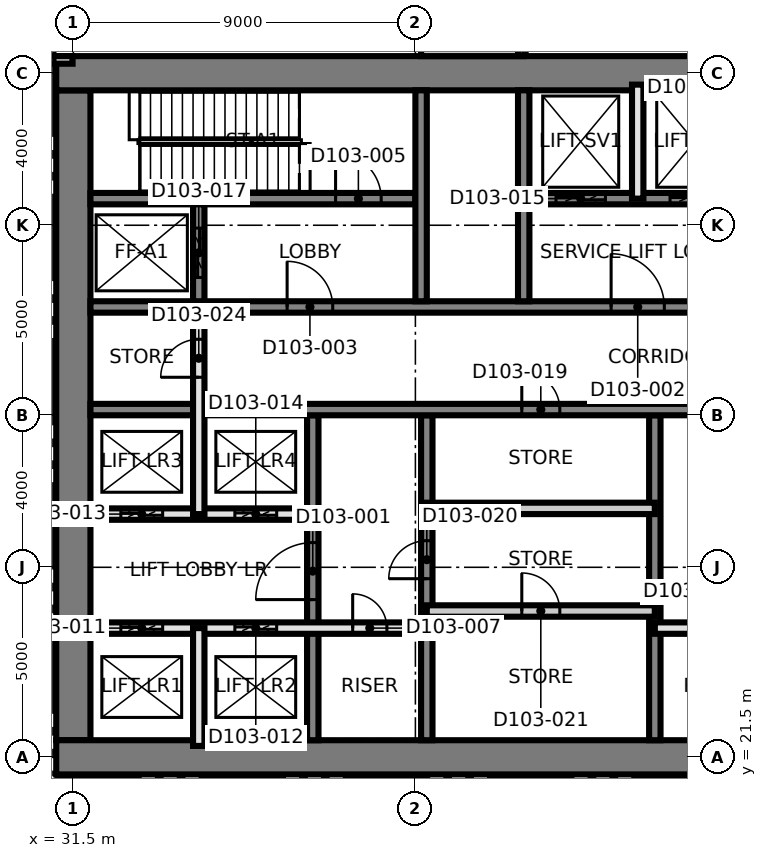
"""IFC4 building model, lengths in metres.
Left out: names, types, materials, properties, quantities, classifications, styles, units other than length and angle.
Written with IfcOpenShell. Run it as: python <this file> out.ifc"""

import sys

from ifc_helpers import new_model, si_unit, direction, frame, frame_2d, origin, place, context, subcontext, project, spatial, rectangle, extrude, element, fill, save


model = new_model("IFC4")
c1 = context("Model", 3, precision=1e-05, world=origin(), true_north=direction((0.0, 1.0)))
c2 = subcontext(c1, "Body", "Model", "MODEL_VIEW")
j1 = project(units=[si_unit("LENGTHUNIT", "METRE"), si_unit("PLANEANGLEUNIT", "RADIAN")], contexts=[c1])
p1 = place(None, origin())
s1 = spatial("IfcSite", under=j1, at=p1, CompositionType="ELEMENT")
p2 = place(p1, origin())
s2 = spatial("IfcBuilding", under=s1, at=p2, CompositionType="ELEMENT")
p3 = place(p2, frame((0.0, 0.0, 8.0)))
s3 = spatial("IfcBuildingStorey", under=s2, at=p3, CompositionType="ELEMENT", Elevation=8.0)
p4 = place(p3, frame((31.5, 21.95, 0.0), z_axis=(0.0, 0.0, 1.0), x_axis=(0.0, 1.0, 0.0)))
e1 = element("IfcWall", 1, at=p4, inside=s3, PredefinedType="SHEAR", context=c2, shape_type="SweptSolid", body=[
    extrude(rectangle(XDim=17.1, YDim=0.9, at=frame_2d((8.55, 0.0))), origin(), (0.0, 0.0, 1.0), 5.5),
])
for number, where, z_axis, x_axis in (
    (2, (31.05, 21.5, 0.0), (0.0, 0.0, 1.0), (1.0, 0.0, 0.0)),
    (3, (31.05, 39.5, 0.0), (0.0, 0.0, 1.0), (1.0, 0.0, 0.0)),
):
    element("IfcWall", number, at=place(p3, frame(where, z_axis=z_axis, x_axis=x_axis)), inside=s3, PredefinedType="SHEAR", context=c2, shape_type="SweptSolid", body=[
        extrude(rectangle(XDim=27.0, YDim=0.9, at=frame_2d((13.5, 0.0))), origin(), (0.0, 0.0, 1.0), 5.5),
    ])
p5 = place(p3, frame((37.8, 21.95, 0.0), z_axis=(0.0, 0.0, 1.0), x_axis=(0.0, 1.0, 0.0)))
e4 = element("IfcWall", 4, at=p5, inside=s3, PredefinedType="SHEAR", context=c2, shape_type="SweptSolid", body=[
    extrude(rectangle(XDim=8.55, YDim=0.3, at=frame_2d((4.275, 0.0))), origin(), (0.0, 0.0, 1.0), 5.5),
])
p6 = place(p5, frame((3.7, 0.0, 0.0)))
e5 = element("IfcOpeningElement", 5, at=p6, cuts=e4, PredefinedType="OPENING", context=c2, shape_type="SweptSolid", body=[
    extrude(rectangle(XDim=1.5, YDim=2.1, at=frame_2d((0.75, 1.05))), frame((0.0, 0.16, 0.0), z_axis=(0.0, -1.0, 0.0), x_axis=(1.0, 0.0, 0.0)), (0.0, 0.0, 1.0), 0.32),
])
p7 = place(p3, frame((40.8, 21.95, 0.0), z_axis=(0.0, 0.0, 1.0), x_axis=(0.0, 1.0, 0.0)))
e6 = element("IfcWall", 6, at=p7, inside=s3, PredefinedType="SHEAR", context=c2, shape_type="SweptSolid", body=[
    extrude(rectangle(XDim=8.55, YDim=0.3, at=frame_2d((4.275, 0.0))), origin(), (0.0, 0.0, 1.0), 5.5),
])
p8 = place(p7, frame((4.25, 0.0, 0.0)))
e7 = element("IfcOpeningElement", 7, at=p8, cuts=e6, PredefinedType="OPENING", context=c2, shape_type="SweptSolid", body=[
    extrude(rectangle(XDim=1.0, YDim=2.1, at=frame_2d((0.5, 1.05))), frame((0.0, 0.16, 0.0), z_axis=(0.0, -1.0, 0.0), x_axis=(1.0, 0.0, 0.0)), (0.0, 0.0, 1.0), 0.32),
])
p9 = place(p3, frame((46.8, 21.95, 0.0), z_axis=(0.0, 0.0, 1.0), x_axis=(0.0, 1.0, 0.0)))
e8 = element("IfcWall", 8, at=p9, inside=s3, PredefinedType="SHEAR", context=c2, shape_type="SweptSolid", body=[
    extrude(rectangle(XDim=8.55, YDim=0.3, at=frame_2d((4.275, 0.0))), origin(), (0.0, 0.0, 1.0), 5.5),
])
p10 = place(p3, frame((31.95, 30.65, 0.0), z_axis=(0.0, 0.0, 1.0), x_axis=(1.0, 0.0, 0.0)))
e9 = element("IfcWall", 9, at=p10, inside=s3, PredefinedType="SHEAR", context=c2, shape_type="SweptSolid", body=[
    extrude(rectangle(XDim=26.1, YDim=0.3, at=frame_2d((13.05, 0.0))), origin(), (0.0, 0.0, 1.0), 5.5),
])
p11 = place(p10, frame((24.55, 0.0, 0.0)))
e10 = element("IfcOpeningElement", 10, at=p11, cuts=e9, PredefinedType="OPENING", context=c2, shape_type="SweptSolid", body=[
    extrude(rectangle(XDim=1.0, YDim=2.1, at=frame_2d((0.5, 1.05))), frame((0.0, 0.16, 0.0), z_axis=(0.0, -1.0, 0.0), x_axis=(1.0, 0.0, 0.0)), (0.0, 0.0, 1.0), 0.32),
])
p12 = place(p10, frame((11.35, 0.0, 0.0)))
e11 = element("IfcOpeningElement", 11, at=p12, cuts=e9, PredefinedType="OPENING", context=c2, shape_type="SweptSolid", body=[
    extrude(rectangle(XDim=1.0, YDim=2.1, at=frame_2d((0.5, 1.05))), frame((0.0, 0.16, 0.0), z_axis=(0.0, -1.0, 0.0), x_axis=(1.0, 0.0, 0.0)), (0.0, 0.0, 1.0), 0.32),
])
p13 = place(p3, frame((31.95, 33.35, 0.0), z_axis=(0.0, 0.0, 1.0), x_axis=(1.0, 0.0, 0.0)))
e12 = element("IfcWall", 12, at=p13, inside=s3, PredefinedType="SHEAR", context=c2, shape_type="SweptSolid", body=[
    extrude(rectangle(XDim=26.1, YDim=0.3, at=frame_2d((13.05, 0.0))), origin(), (0.0, 0.0, 1.0), 5.5),
])
p14 = place(p13, frame((13.7, 0.0, 0.0)))
e13 = element("IfcOpeningElement", 13, at=p14, cuts=e12, PredefinedType="OPENING", context=c2, shape_type="SweptSolid", body=[
    extrude(rectangle(XDim=1.4, YDim=2.1, at=frame_2d((0.7, 1.05))), frame((0.0, 0.16, 0.0), z_axis=(0.0, -1.0, 0.0), x_axis=(1.0, 0.0, 0.0)), (0.0, 0.0, 1.0), 0.32),
])
p15 = place(p13, frame((5.175, 0.0, 0.0)))
e14 = element("IfcOpeningElement", 14, at=p15, cuts=e12, PredefinedType="OPENING", context=c2, shape_type="SweptSolid", body=[
    extrude(rectangle(XDim=1.2, YDim=2.1, at=frame_2d((0.6, 1.05))), frame((0.0, 0.16, 0.0), z_axis=(0.0, -1.0, 0.0), x_axis=(1.0, 0.0, 0.0)), (0.0, 0.0, 1.0), 0.32),
])
p16 = place(p13, frame((19.725, 0.0, 0.0)))
e15 = element("IfcOpeningElement", 15, at=p16, cuts=e12, PredefinedType="OPENING", context=c2, shape_type="SweptSolid", body=[
    extrude(rectangle(XDim=1.2, YDim=2.1, at=frame_2d((0.6, 1.05))), frame((0.0, 0.16, 0.0), z_axis=(0.0, -1.0, 0.0), x_axis=(1.0, 0.0, 0.0)), (0.0, 0.0, 1.0), 0.32),
])
p17 = place(p3, frame((31.95, 36.2, 0.0), z_axis=(0.0, 0.0, 1.0), x_axis=(1.0, 0.0, 0.0)))
e16 = element("IfcWall", 16, at=p17, inside=s3, PredefinedType="SHEAR", context=c2, shape_type="SweptSolid", body=[
    extrude(rectangle(XDim=8.55, YDim=0.3, at=frame_2d((4.275, 0.0))), origin(), (0.0, 0.0, 1.0), 5.5),
])
p18 = place(p17, frame((6.45, 0.0, 0.0)))
e17 = element("IfcOpeningElement", 17, at=p18, cuts=e16, PredefinedType="OPENING", context=c2, shape_type="SweptSolid", body=[
    extrude(rectangle(XDim=1.2, YDim=2.1, at=frame_2d((0.6, 1.05))), frame((0.0, 0.16, 0.0), z_axis=(0.0, -1.0, 0.0), x_axis=(1.0, 0.0, 0.0)), (0.0, 0.0, 1.0), 0.32),
])
p19 = place(p3, frame((43.5, 36.2, 0.0), z_axis=(0.0, 0.0, 1.0), x_axis=(1.0, 0.0, 0.0)))
e18 = element("IfcWall", 18, at=p19, inside=s3, PredefinedType="SHEAR", context=c2, shape_type="SweptSolid", body=[
    extrude(rectangle(XDim=14.55, YDim=0.3, at=frame_2d((7.275, 0.0))), origin(), (0.0, 0.0, 1.0), 5.5),
])
p20 = place(p19, frame((6.9, 0.0, 0.0)))
e19 = element("IfcOpeningElement", 19, at=p20, cuts=e18, PredefinedType="OPENING", context=c2, shape_type="SweptSolid", body=[
    extrude(rectangle(XDim=1.2, YDim=2.1, at=frame_2d((0.6, 1.05))), frame((0.0, 0.16, 0.0), z_axis=(0.0, -1.0, 0.0), x_axis=(1.0, 0.0, 0.0)), (0.0, 0.0, 1.0), 0.32),
])
p21 = place(p19, frame((0.7, 0.0, 0.0)))
e20 = element("IfcOpeningElement", 20, at=p21, cuts=e18, PredefinedType="OPENING", context=c2, shape_type="SweptSolid", body=[
    extrude(rectangle(XDim=1.3, YDim=2.4, at=frame_2d((0.65, 1.2))), frame((0.0, 0.16, 0.0), z_axis=(0.0, -1.0, 0.0), x_axis=(1.0, 0.0, 0.0)), (0.0, 0.0, 1.0), 0.32),
])
p22 = place(p19, frame((3.7, 0.0, 0.0)))
e21 = element("IfcOpeningElement", 21, at=p22, cuts=e18, PredefinedType="OPENING", context=c2, shape_type="SweptSolid", body=[
    extrude(rectangle(XDim=1.3, YDim=2.4, at=frame_2d((0.65, 1.2))), frame((0.0, 0.16, 0.0), z_axis=(0.0, -1.0, 0.0), x_axis=(1.0, 0.0, 0.0)), (0.0, 0.0, 1.0), 0.32),
])
for number, where, z_axis, x_axis in (
    (22, (40.65, 33.5, 0.0), (0.0, 0.0, 1.0), (0.0, 1.0, 0.0)),
    (23, (43.35, 33.5, 0.0), (0.0, 0.0, 1.0), (0.0, 1.0, 0.0)),
):
    element("IfcWall", number, at=place(p3, frame(where, z_axis=z_axis, x_axis=x_axis)), inside=s3, PredefinedType="SHEAR", context=c2, shape_type="SweptSolid", body=[
        extrude(rectangle(XDim=5.55, YDim=0.3, at=frame_2d((2.775, 0.0))), origin(), (0.0, 0.0, 1.0), 5.5),
    ])
p23 = place(p3, frame((34.8, 33.5, 0.0), z_axis=(0.0, 0.0, 1.0), x_axis=(0.0, 1.0, 0.0)))
e24 = element("IfcWall", 24, at=p23, inside=s3, PredefinedType="SHEAR", context=c2, shape_type="SweptSolid", body=[
    extrude(rectangle(XDim=2.55, YDim=0.3, at=frame_2d((1.275, 0.0))), origin(), (0.0, 0.0, 1.0), 5.5),
])
p24 = place(p23, frame((0.625, 0.0, 0.0)))
e25 = element("IfcOpeningElement", 25, at=p24, cuts=e24, PredefinedType="OPENING", context=c2, shape_type="SweptSolid", body=[
    extrude(rectangle(XDim=1.3, YDim=2.4, at=frame_2d((0.65, 1.2))), frame((0.0, 0.16, 0.0), z_axis=(0.0, -1.0, 0.0), x_axis=(1.0, 0.0, 0.0)), (0.0, 0.0, 1.0), 0.32),
])
p25 = place(p3, frame((31.8, 24.9, 0.0), z_axis=(0.0, 0.0, 1.0), x_axis=(1.0, 0.0, 0.0)))
e26 = element("IfcWall", 26, at=p25, inside=s3, PredefinedType="SOLIDWALL", context=c2, shape_type="SweptSolid", body=[
    extrude(rectangle(XDim=9.0, YDim=0.3, at=frame_2d((4.5, 0.0))), origin(), (0.0, 0.0, 1.0), 5.2),
])
p26 = place(p25, frame((7.05, 0.0, 0.0)))
e27 = element("IfcOpeningElement", 27, at=p26, cuts=e26, PredefinedType="OPENING", context=c2, shape_type="SweptSolid", body=[
    extrude(rectangle(XDim=0.9, YDim=2.1, at=frame_2d((0.45, 1.05))), frame((0.0, 0.16, 0.0), z_axis=(0.0, -1.0, 0.0), x_axis=(1.0, 0.0, 0.0)), (0.0, 0.0, 1.0), 0.32),
])
p27 = place(p25, frame((0.95, 0.0, 0.0)))
e28 = element("IfcOpeningElement", 28, at=p27, cuts=e26, PredefinedType="OPENING", context=c2, shape_type="SweptSolid", body=[
    extrude(rectangle(XDim=1.1, YDim=2.4, at=frame_2d((0.55, 1.2))), frame((0.0, 0.16, 0.0), z_axis=(0.0, -1.0, 0.0), x_axis=(1.0, 0.0, 0.0)), (0.0, 0.0, 1.0), 0.32),
])
p28 = place(p25, frame((3.95, 0.0, 0.0)))
e29 = element("IfcOpeningElement", 29, at=p28, cuts=e26, PredefinedType="OPENING", context=c2, shape_type="SweptSolid", body=[
    extrude(rectangle(XDim=1.1, YDim=2.4, at=frame_2d((0.55, 1.2))), frame((0.0, 0.16, 0.0), z_axis=(0.0, -1.0, 0.0), x_axis=(1.0, 0.0, 0.0)), (0.0, 0.0, 1.0), 0.32),
])
p29 = place(p3, frame((46.8, 24.9, 0.0), z_axis=(0.0, 0.0, 1.0), x_axis=(1.0, 0.0, 0.0)))
e30 = element("IfcWall", 30, at=p29, inside=s3, PredefinedType="SOLIDWALL", context=c2, shape_type="SweptSolid", body=[
    extrude(rectangle(XDim=9.0, YDim=0.3, at=frame_2d((4.5, 0.0))), origin(), (0.0, 0.0, 1.0), 5.2),
])
p30 = place(p29, frame((1.05, 0.0, 0.0)))
e31 = element("IfcOpeningElement", 31, at=p30, cuts=e30, PredefinedType="OPENING", context=c2, shape_type="SweptSolid", body=[
    extrude(rectangle(XDim=0.9, YDim=2.1, at=frame_2d((0.45, 1.05))), frame((0.0, 0.16, 0.0), z_axis=(0.0, -1.0, 0.0), x_axis=(1.0, 0.0, 0.0)), (0.0, 0.0, 1.0), 0.32),
])
p31 = place(p3, frame((40.8, 25.35, 0.0), z_axis=(0.0, 0.0, 1.0), x_axis=(1.0, 0.0, 0.0)))
e32 = element("IfcWall", 32, at=p31, inside=s3, PredefinedType="PARTITIONING", context=c2, shape_type="SweptSolid", body=[
    extrude(rectangle(XDim=6.0, YDim=0.3, at=frame_2d((3.0, 0.0))), origin(), (0.0, 0.0, 1.0), 5.2),
])
p32 = place(p31, frame((2.5, 0.0, 0.0)))
e33 = element("IfcOpeningElement", 33, at=p32, cuts=e32, PredefinedType="OPENING", context=c2, shape_type="SweptSolid", body=[
    extrude(rectangle(XDim=1.0, YDim=2.1, at=frame_2d((0.5, 1.05))), frame((0.0, 0.16, 0.0), z_axis=(0.0, -1.0, 0.0), x_axis=(1.0, 0.0, 0.0)), (0.0, 0.0, 1.0), 0.32),
])
p33 = place(p3, frame((31.8, 27.9, 0.0), z_axis=(0.0, 0.0, 1.0), x_axis=(1.0, 0.0, 0.0)))
e34 = element("IfcWall", 34, at=p33, inside=s3, PredefinedType="SOLIDWALL", context=c2, shape_type="SweptSolid", body=[
    extrude(rectangle(XDim=6.0, YDim=0.3, at=frame_2d((3.0, 0.0))), origin(), (0.0, 0.0, 1.0), 5.2),
])
p34 = place(p33, frame((0.95, 0.0, 0.0)))
e35 = element("IfcOpeningElement", 35, at=p34, cuts=e34, PredefinedType="OPENING", context=c2, shape_type="SweptSolid", body=[
    extrude(rectangle(XDim=1.1, YDim=2.4, at=frame_2d((0.55, 1.2))), frame((0.0, 0.16, 0.0), z_axis=(0.0, -1.0, 0.0), x_axis=(1.0, 0.0, 0.0)), (0.0, 0.0, 1.0), 0.32),
])
p35 = place(p33, frame((3.95, 0.0, 0.0)))
e36 = element("IfcOpeningElement", 36, at=p35, cuts=e34, PredefinedType="OPENING", context=c2, shape_type="SweptSolid", body=[
    extrude(rectangle(XDim=1.1, YDim=2.4, at=frame_2d((0.55, 1.2))), frame((0.0, 0.16, 0.0), z_axis=(0.0, -1.0, 0.0), x_axis=(1.0, 0.0, 0.0)), (0.0, 0.0, 1.0), 0.32),
])
p36 = place(p3, frame((40.8, 28.05, 0.0), z_axis=(0.0, 0.0, 1.0), x_axis=(1.0, 0.0, 0.0)))
e37 = element("IfcWall", 37, at=p36, inside=s3, PredefinedType="PARTITIONING", context=c2, shape_type="SweptSolid", body=[
    extrude(rectangle(XDim=6.0, YDim=0.3, at=frame_2d((3.0, 0.0))), origin(), (0.0, 0.0, 1.0), 5.2),
])
p37 = place(p3, frame((40.65, 40.1, 0.0), z_axis=(0.0, 0.0, 1.0), x_axis=(1.0, 0.0, 0.0)))
e38 = element("IfcWall", 38, at=p37, inside=s3, PredefinedType="PARTITIONING", context=c2, shape_type="SweptSolid", body=[
    extrude(rectangle(XDim=2.7, YDim=0.3, at=frame_2d((1.35, 0.0))), origin(), (0.0, 0.0, 1.0), 5.2),
])
p38 = place(p3, frame((34.8, 21.8, 0.0), z_axis=(0.0, 0.0, 1.0), x_axis=(0.0, 1.0, 0.0)))
e39 = element("IfcWall", 39, at=p38, inside=s3, PredefinedType="SOLIDWALL", context=c2, shape_type="SweptSolid", body=[
    extrude(rectangle(XDim=3.1, YDim=0.3, at=frame_2d((1.55, 0.0))), origin(), (0.0, 0.0, 1.0), 5.2),
])
p39 = place(p3, frame((34.8, 27.9, 0.0), z_axis=(0.0, 0.0, 1.0), x_axis=(0.0, 1.0, 0.0)))
e40 = element("IfcWall", 40, at=p39, inside=s3, PredefinedType="SOLIDWALL", context=c2, shape_type="SweptSolid", body=[
    extrude(rectangle(XDim=5.45, YDim=0.3, at=frame_2d((2.725, 0.0))), origin(), (0.0, 0.0, 1.0), 5.2),
])
p40 = place(p39, frame((3.6, 0.0, 0.0)))
e41 = element("IfcOpeningElement", 41, at=p40, cuts=e40, PredefinedType="OPENING", context=c2, shape_type="SweptSolid", body=[
    extrude(rectangle(XDim=1.0, YDim=2.1, at=frame_2d((0.5, 1.05))), frame((0.0, 0.16, 0.0), z_axis=(0.0, -1.0, 0.0), x_axis=(1.0, 0.0, 0.0)), (0.0, 0.0, 1.0), 0.32),
])
p41 = place(p3, frame((46.35, 36.2, 0.0), z_axis=(0.0, 0.0, 1.0), x_axis=(0.0, 1.0, 0.0)))
e42 = element("IfcWall", 42, at=p41, inside=s3, PredefinedType="SOLIDWALL", context=c2, shape_type="SweptSolid", body=[
    extrude(rectangle(XDim=3.0, YDim=0.3, at=frame_2d((1.5, 0.0))), origin(), (0.0, 0.0, 1.0), 5.2),
])
p42 = place(p3, frame((21.07, 39.85, 0.0), z_axis=(0.0, 0.0, 1.0), x_axis=(1.0, 0.0, 0.0)))
e43 = element("IfcWall", 43, at=p42, inside=s3, PredefinedType="PARTITIONING", context=c2, shape_type="SweptSolid", body=[
    extrude(rectangle(XDim=10.41, YDim=0.2, at=frame_2d((5.205, 0.0))), origin(), (0.0, 0.0, 1.0), 5.2),
])
p43 = place(p42, frame((4.557, 0.0, 0.0)))
e44 = element("IfcOpeningElement", 44, at=p43, cuts=e43, PredefinedType="OPENING", context=c2, shape_type="SweptSolid", body=[
    extrude(rectangle(XDim=1.0, YDim=2.1, at=frame_2d((0.5, 1.05))), frame((0.0, 0.11, 0.0), z_axis=(0.0, -1.0, 0.0), x_axis=(1.0, 0.0, 0.0)), (0.0, 0.0, 1.0), 0.22),
])
p44 = place(p3, frame((43.3, 39.97, 0.0), z_axis=(0.0, 0.0, 1.0), x_axis=(0.0, 1.0, 0.0)))
e45 = element("IfcWall", 45, at=p44, inside=s3, PredefinedType="PARTITIONING", context=c2, shape_type="SweptSolid", body=[
    extrude(rectangle(XDim=2.28, YDim=0.2, at=frame_2d((1.14, 0.0))), origin(), (0.0, 0.0, 1.0), 5.2),
])
p45 = place(p6, origin())
e46 = element("IfcDoor", 46, at=p45, inside=s3, OperationType="SINGLE_SWING_LEFT", PredefinedType="DOOR", context=c2, shape_type="SweptSolid", body=[
    extrude(rectangle(XDim=1.5, YDim=2.1, at=frame_2d((0.75, 1.05))), frame((0.0, 0.025, 0.0), z_axis=(0.0, -1.0, 0.0), x_axis=(1.0, 0.0, 0.0)), (0.0, 0.0, 1.0), 0.05),
])
fill(e5, e46)
p46 = place(p14, origin())
e47 = element("IfcDoor", 47, at=p46, inside=s3, OperationType="SINGLE_SWING_RIGHT", PredefinedType="DOOR", context=c2, shape_type="SweptSolid", body=[
    extrude(rectangle(XDim=1.4, YDim=2.1, at=frame_2d((0.7, 1.05))), frame((0.0, 0.025, 0.0), z_axis=(0.0, -1.0, 0.0), x_axis=(1.0, 0.0, 0.0)), (0.0, 0.0, 1.0), 0.05),
])
fill(e13, e47)
p47 = place(p15, origin())
e48 = element("IfcDoor", 48, at=p47, inside=s3, OperationType="SINGLE_SWING_LEFT", PredefinedType="DOOR", context=c2, shape_type="SweptSolid", body=[
    extrude(rectangle(XDim=1.2, YDim=2.1, at=frame_2d((0.6, 1.05))), frame((0.0, 0.025, 0.0), z_axis=(0.0, -1.0, 0.0), x_axis=(1.0, 0.0, 0.0)), (0.0, 0.0, 1.0), 0.05),
])
fill(e14, e48)
p48 = place(p18, origin())
e49 = element("IfcDoor", 49, at=p48, inside=s3, OperationType="SINGLE_SWING_RIGHT", PredefinedType="DOOR", context=c2, shape_type="SweptSolid", body=[
    extrude(rectangle(XDim=1.2, YDim=2.1, at=frame_2d((0.6, 1.05))), frame((0.0, 0.025, 0.0), z_axis=(0.0, -1.0, 0.0), x_axis=(1.0, 0.0, 0.0)), (0.0, 0.0, 1.0), 0.05),
])
fill(e17, e49)
p49 = place(p26, origin())
e50 = element("IfcDoor", 50, at=p49, inside=s3, OperationType="SINGLE_SWING_LEFT", PredefinedType="DOOR", context=c2, shape_type="SweptSolid", body=[
    extrude(rectangle(XDim=0.9, YDim=2.1, at=frame_2d((0.45, 1.05))), frame((0.0, 0.025, 0.0), z_axis=(0.0, -1.0, 0.0), x_axis=(1.0, 0.0, 0.0)), (0.0, 0.0, 1.0), 0.05),
])
fill(e27, e50)
p50 = place(p27, origin())
e51 = element("IfcDoor", 51, at=p50, inside=s3, OperationType="SLIDING_TO_LEFT", PredefinedType="DOOR", context=c2, shape_type="SweptSolid", body=[
    extrude(rectangle(XDim=1.1, YDim=2.4, at=frame_2d((0.55, 1.2))), frame((0.0, 0.025, 0.0), z_axis=(0.0, -1.0, 0.0), x_axis=(1.0, 0.0, 0.0)), (0.0, 0.0, 1.0), 0.05),
])
fill(e28, e51)
p51 = place(p28, origin())
e52 = element("IfcDoor", 52, at=p51, inside=s3, OperationType="SLIDING_TO_LEFT", PredefinedType="DOOR", context=c2, shape_type="SweptSolid", body=[
    extrude(rectangle(XDim=1.1, YDim=2.4, at=frame_2d((0.55, 1.2))), frame((0.0, 0.025, 0.0), z_axis=(0.0, -1.0, 0.0), x_axis=(1.0, 0.0, 0.0)), (0.0, 0.0, 1.0), 0.05),
])
fill(e29, e52)
p52 = place(p34, origin())
e53 = element("IfcDoor", 53, at=p52, inside=s3, OperationType="SLIDING_TO_LEFT", PredefinedType="DOOR", context=c2, shape_type="SweptSolid", body=[
    extrude(rectangle(XDim=1.1, YDim=2.4, at=frame_2d((0.55, 1.2))), frame((0.0, 0.025, 0.0), z_axis=(0.0, -1.0, 0.0), x_axis=(1.0, 0.0, 0.0)), (0.0, 0.0, 1.0), 0.05),
])
fill(e35, e53)
p53 = place(p35, origin())
e54 = element("IfcDoor", 54, at=p53, inside=s3, OperationType="SLIDING_TO_LEFT", PredefinedType="DOOR", context=c2, shape_type="SweptSolid", body=[
    extrude(rectangle(XDim=1.1, YDim=2.4, at=frame_2d((0.55, 1.2))), frame((0.0, 0.025, 0.0), z_axis=(0.0, -1.0, 0.0), x_axis=(1.0, 0.0, 0.0)), (0.0, 0.0, 1.0), 0.05),
])
fill(e36, e54)
p54 = place(p21, origin())
e55 = element("IfcDoor", 55, at=p54, inside=s3, OperationType="SLIDING_TO_LEFT", PredefinedType="DOOR", context=c2, shape_type="SweptSolid", body=[
    extrude(rectangle(XDim=1.3, YDim=2.4, at=frame_2d((0.65, 1.2))), frame((0.0, 0.025, 0.0), z_axis=(0.0, -1.0, 0.0), x_axis=(1.0, 0.0, 0.0)), (0.0, 0.0, 1.0), 0.05),
])
fill(e20, e55)
p55 = place(p22, origin())
e56 = element("IfcDoor", 56, at=p55, inside=s3, OperationType="SLIDING_TO_LEFT", PredefinedType="DOOR", context=c2, shape_type="SweptSolid", body=[
    extrude(rectangle(XDim=1.3, YDim=2.4, at=frame_2d((0.65, 1.2))), frame((0.0, 0.025, 0.0), z_axis=(0.0, -1.0, 0.0), x_axis=(1.0, 0.0, 0.0)), (0.0, 0.0, 1.0), 0.05),
])
fill(e21, e56)
p56 = place(p24, origin())
e57 = element("IfcDoor", 57, at=p56, inside=s3, OperationType="SLIDING_TO_LEFT", PredefinedType="DOOR", context=c2, shape_type="SweptSolid", body=[
    extrude(rectangle(XDim=1.3, YDim=2.4, at=frame_2d((0.65, 1.2))), frame((0.0, 0.025, 0.0), z_axis=(0.0, -1.0, 0.0), x_axis=(1.0, 0.0, 0.0)), (0.0, 0.0, 1.0), 0.05),
])
fill(e25, e57)
p57 = place(p12, origin())
e58 = element("IfcDoor", 58, at=p57, inside=s3, OperationType="SINGLE_SWING_LEFT", PredefinedType="DOOR", context=c2, shape_type="SweptSolid", body=[
    extrude(rectangle(XDim=1.0, YDim=2.1, at=frame_2d((0.5, 1.05))), frame((0.0, 0.025, 0.0), z_axis=(0.0, -1.0, 0.0), x_axis=(1.0, 0.0, 0.0)), (0.0, 0.0, 1.0), 0.05),
])
fill(e11, e58)
p58 = place(p8, origin())
e59 = element("IfcDoor", 59, at=p58, inside=s3, OperationType="SINGLE_SWING_RIGHT", PredefinedType="DOOR", context=c2, shape_type="SweptSolid", body=[
    extrude(rectangle(XDim=1.0, YDim=2.1, at=frame_2d((0.5, 1.05))), frame((0.0, 0.025, 0.0), z_axis=(0.0, -1.0, 0.0), x_axis=(1.0, 0.0, 0.0)), (0.0, 0.0, 1.0), 0.05),
])
fill(e7, e59)
p59 = place(p32, origin())
e60 = element("IfcDoor", 60, at=p59, inside=s3, OperationType="SINGLE_SWING_RIGHT", PredefinedType="DOOR", context=c2, shape_type="SweptSolid", body=[
    extrude(rectangle(XDim=1.0, YDim=2.1, at=frame_2d((0.5, 1.05))), frame((0.0, 0.025, 0.0), z_axis=(0.0, -1.0, 0.0), x_axis=(1.0, 0.0, 0.0)), (0.0, 0.0, 1.0), 0.05),
])
fill(e33, e60)
p60 = place(p40, origin())
e61 = element("IfcDoor", 61, at=p60, inside=s3, OperationType="SINGLE_SWING_RIGHT", PredefinedType="DOOR", context=c2, shape_type="SweptSolid", body=[
    extrude(rectangle(XDim=1.0, YDim=2.1, at=frame_2d((0.5, 1.05))), frame((0.0, 0.025, 0.0), z_axis=(0.0, -1.0, 0.0), x_axis=(1.0, 0.0, 0.0)), (0.0, 0.0, 1.0), 0.05),
])
fill(e41, e61)
save(model, sys.argv[1])
